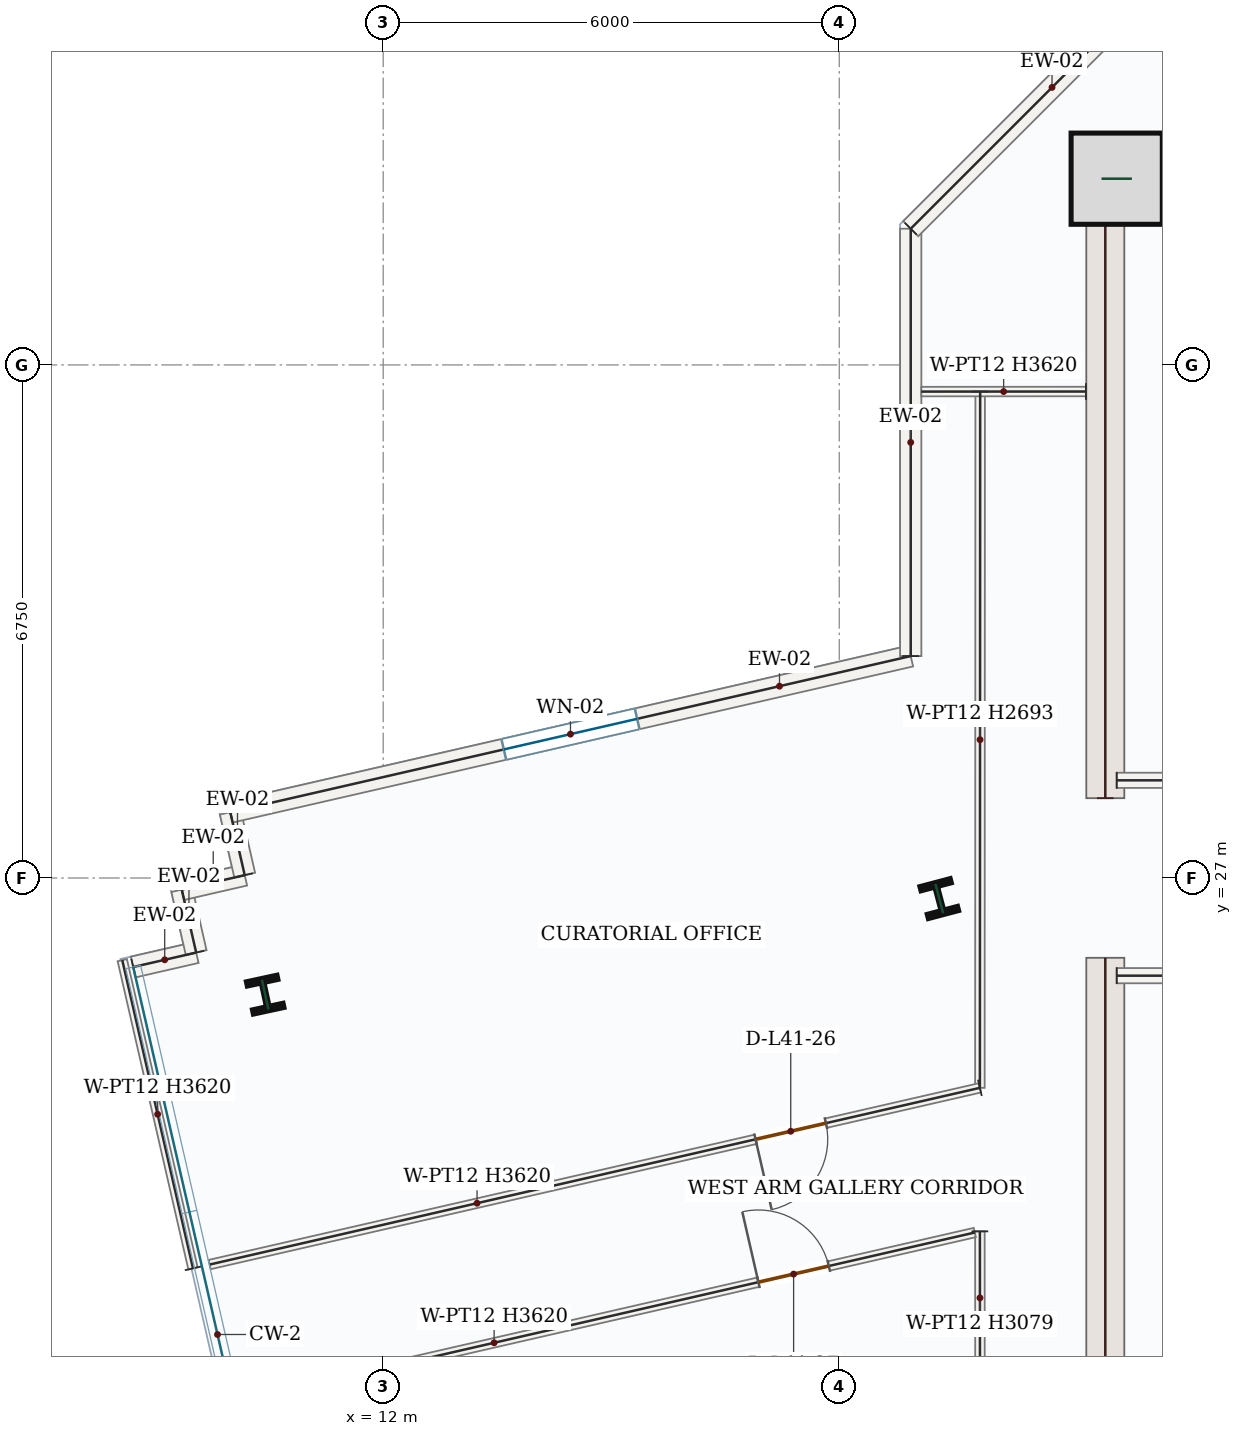
"""IFC4 building model, lengths in metres.
Left out: names, types, materials, properties, quantities, classifications, styles, units other than length and angle.
Written with IfcOpenShell. Run it as: python <this file> out.ifc"""

import sys

from ifc_helpers import new_model, si_unit, direction, frame, frame_2d, origin, origin_2d, place, context, subcontext, project, spatial, rectangle, i_section, extrude, source, transform, mapped, element, fill, save


model = new_model("IFC4")
c1 = context("Model", 3, precision=1e-05, world=origin(), true_north=direction((0.0, 1.0)))
c2 = subcontext(c1, "Body", "Model", "MODEL_VIEW")
j1 = project(units=[si_unit("LENGTHUNIT", "METRE"), si_unit("PLANEANGLEUNIT", "RADIAN")], contexts=[c1])
p1 = place(None, origin())
s1 = spatial("IfcSite", under=j1, at=p1, CompositionType="ELEMENT")
p2 = place(p1, origin())
s2 = spatial("IfcBuilding", under=s1, at=p2, CompositionType="ELEMENT")
p3 = place(p2, frame((0.0, 0.0, 178.5)))
s3 = spatial("IfcBuildingStorey", under=s2, at=p3, CompositionType="ELEMENT", Elevation=178.5)
m1 = source(origin(), c2, "Body", "SweptSolid", [
    extrude(rectangle(XDim=8.55, YDim=0.5, at=frame_2d((4.275, 0.0))), origin(), (0.0, 0.0, 1.0), 3.62),
])
for number, where, z_axis, x_axis in (
    (1, (21.5, 17.4, 0.0), (0.0, 0.0, 1.0), (0.0, 1.0, 0.0)),
    (2, (21.5, 28.05, 0.0), (0.0, 0.0, 1.0), (0.0, 1.0, 0.0)),
):
    element("IfcWall", number, at=place(p3, frame(where, z_axis=z_axis, x_axis=x_axis)), inside=s3, PredefinedType="SHEAR", context=c2, shape_type="MappedRepresentation", body=[
        mapped(m1, transform((0.0, 0.0, 0.0), x_axis=(1.0, 0.0, 0.0), y_axis=(0.0, 1.0, 0.0), z_axis=(0.0, 0.0, 1.0), scale=1.0)),
    ])
m2 = source(origin(), c2, "Body", "SweptSolid", [
    extrude(rectangle(XDim=7.0, YDim=0.5, at=frame_2d((3.5, 0.0))), origin(), (0.0, 0.0, 1.0), 3.62),
])
p4 = place(p3, frame((21.75, 36.35, 0.0), z_axis=(0.0, 0.0, 1.0), x_axis=(1.0, 0.0, 0.0)))
e3 = element("IfcWall", 3, at=p4, inside=s3, PredefinedType="SHEAR", context=c2, shape_type="MappedRepresentation", body=[
    mapped(m2, transform((0.0, 0.0, 0.0), x_axis=(1.0, 0.0, 0.0), y_axis=(0.0, 1.0, 0.0), z_axis=(0.0, 0.0, 1.0), scale=1.0)),
])
m3 = source(origin(), c2, "Body", "SweptSolid", [
    extrude(rectangle(XDim=1.2, YDim=1.2, at=origin_2d()), origin(), (0.0, 0.0, 1.0), 3.9),
])
p5 = place(p3, frame((21.65, 36.2, 0.0), z_axis=(0.0, 0.0, 1.0), x_axis=(1.0, 0.0, 0.0)))
e4 = element("IfcColumn", 4, at=p5, inside=s3, PredefinedType="COLUMN", context=c2, shape_type="MappedRepresentation", body=[
    mapped(m3, transform((0.0, 0.0, 0.0), x_axis=(1.0, 0.0, 0.0), y_axis=(0.0, 1.0, 0.0), z_axis=(0.0, 0.0, 1.0), scale=1.0)),
])
m4 = source(origin(), c2, "Body", "SweptSolid", [
    extrude(i_section(OverallWidth=0.412, OverallDepth=0.435, WebThickness=0.036, FlangeThickness=0.057, FilletRadius=0.018, at=origin_2d()), origin(), (0.0, 0.0, 1.0), 3.9),
])
for number, where, z_axis, x_axis in (
    (5, (19.316, 26.729, 0.0), (0.0, 0.0, 1.0), (0.967, 0.255, 0.0)),
    (6, (10.447, 25.465, 0.0), (0.0, 0.0, 1.0), (0.977, 0.211, 0.0)),
):
    element("IfcColumn", number, at=place(p3, frame(where, z_axis=z_axis, x_axis=x_axis)), inside=s3, PredefinedType="COLUMN", context=c2, shape_type="MappedRepresentation", body=[
        mapped(m4, transform((0.0, 0.0, 0.0), x_axis=(1.0, 0.0, 0.0), y_axis=(0.0, 1.0, 0.0), z_axis=(0.0, 0.0, 1.0), scale=1.0)),
    ])
m5 = source(origin(), c2, "Body", "SweptSolid", [
    extrude(rectangle(XDim=0.85, YDim=0.28, at=frame_2d((0.425, 0.0))), origin(), (0.0, 0.0, 1.0), 3.62),
])
p6 = place(p3, frame((8.711, 25.829, 0.0), z_axis=(0.0, 0.0, 1.0), x_axis=(0.974704946586, 0.223495563939, 0.0)))
e7 = element("IfcWall", 7, at=p6, inside=s3, PredefinedType="SOLIDWALL", context=c2, shape_type="MappedRepresentation", body=[
    mapped(m5, transform((0.0, 0.0, 0.0), x_axis=(1.0, 0.0, 0.0), y_axis=(0.0, 1.0, 0.0), z_axis=(0.0, 0.0, 1.0), scale=1.0)),
])
m6 = source(origin(), c2, "Body", "SweptSolid", [
    extrude(rectangle(XDim=0.85, YDim=0.28, at=frame_2d((0.425, 0.0))), origin(), (0.0, 0.0, 1.0), 3.62),
])
p7 = place(p3, frame((9.539, 26.019, 0.0), z_axis=(0.0, 0.0, 1.0), x_axis=(-0.22316012353, 0.974781800849, 0.0)))
e8 = element("IfcWall", 8, at=p7, inside=s3, PredefinedType="SOLIDWALL", context=c2, shape_type="MappedRepresentation", body=[
    mapped(m6, transform((0.0, 0.0, 0.0), x_axis=(1.0, 0.0, 0.0), y_axis=(0.0, 1.0, 0.0), z_axis=(0.0, 0.0, 1.0), scale=1.0)),
])
for number, where, z_axis, x_axis in (
    (9, (9.35, 26.847, 0.0), (0.0, 0.0, 1.0), (0.975, 0.223, 0.0)),
    (10, (10.178, 27.037, 0.0), (0.0, 0.0, 1.0), (-0.224, 0.975, 0.0)),
):
    element("IfcWall", number, at=place(p3, frame(where, z_axis=z_axis, x_axis=x_axis)), inside=s3, PredefinedType="SOLIDWALL", context=c2, shape_type="MappedRepresentation", body=[
        mapped(m5, transform((0.0, 0.0, 0.0), x_axis=(1.0, 0.0, 0.0), y_axis=(0.0, 1.0, 0.0), z_axis=(0.0, 0.0, 1.0), scale=1.0)),
    ])
p8 = place(p3, frame((9.988, 27.866, 0.0), z_axis=(0.0, 0.0, 1.0), x_axis=(0.974680686557, 0.223601340005, 0.0)))
e11 = element("IfcWall", 11, at=p8, inside=s3, PredefinedType="SOLIDWALL", context=c2, shape_type="SweptSolid", body=[
    extrude(rectangle(XDim=9.185, YDim=0.28, at=frame_2d((4.592, 0.0))), origin(), (0.0, 0.0, 1.0), 3.62),
])
p9 = place(p8, frame((3.692, 0.0, 0.85)))
e12 = element("IfcOpeningElement", 12, at=p9, cuts=e11, PredefinedType="OPENING", context=c2, shape_type="SweptSolid", body=[
    extrude(rectangle(XDim=1.8, YDim=1.75, at=frame_2d((0.9, 0.875))), frame((0.0, 0.15, 0.0), z_axis=(0.0, -1.0, 0.0), x_axis=(1.0, 0.0, 0.0)), (0.0, 0.0, 1.0), 0.3),
])
m7 = source(origin(), c2, "Body", "SweptSolid", [
    extrude(rectangle(XDim=5.623, YDim=0.28, at=frame_2d((2.811, 0.0))), origin(), (0.0, 0.0, 1.0), 3.62),
])
p10 = place(p3, frame((18.94, 29.919, 0.0), z_axis=(0.0, 0.0, 1.0), x_axis=(0.0, 1.0, 0.0)))
e13 = element("IfcWall", 13, at=p10, inside=s3, PredefinedType="SOLIDWALL", context=c2, shape_type="MappedRepresentation", body=[
    mapped(m7, transform((0.0, 0.0, 0.0), x_axis=(1.0, 0.0, 0.0), y_axis=(0.0, 1.0, 0.0), z_axis=(0.0, 0.0, 1.0), scale=1.0)),
])
m8 = source(origin(), c2, "Body", "SweptSolid", [
    extrude(rectangle(XDim=5.258, YDim=0.28, at=frame_2d((2.629, 0.0))), origin(), (0.0, 0.0, 1.0), 3.62),
])
p11 = place(p3, frame((18.94, 35.542, 0.0), z_axis=(0.0, 0.0, 1.0), x_axis=(0.707106781187, 0.707106781187, 0.0)))
e14 = element("IfcWall", 14, at=p11, inside=s3, PredefinedType="SOLIDWALL", context=c2, shape_type="MappedRepresentation", body=[
    mapped(m8, transform((0.0, 0.0, 0.0), x_axis=(1.0, 0.0, 0.0), y_axis=(0.0, 1.0, 0.0), z_axis=(0.0, 0.0, 1.0), scale=1.0)),
])
m9 = source(origin(), c2, "Body", "SweptSolid", [
    extrude(rectangle(XDim=4.25, YDim=0.2, at=frame_2d((2.125, 0.0))), origin(), (0.0, 0.0, 1.0), 3.62),
])
for number, where, z_axis, x_axis in (
    (15, (21.65, 25.715, 0.0), (0.0, 0.0, 1.0), (1.0, 0.0, 0.0)),
    (16, (21.65, 28.285, 0.0), (0.0, 0.0, 1.0), (1.0, 0.0, 0.0)),
):
    element("IfcWall", number, at=place(p3, frame(where, z_axis=z_axis, x_axis=x_axis)), inside=s3, PredefinedType="SOLIDWALL", context=c2, shape_type="MappedRepresentation", body=[
        mapped(m9, transform((0.0, 0.0, 0.0), x_axis=(1.0, 0.0, 0.0), y_axis=(0.0, 1.0, 0.0), z_axis=(0.0, 0.0, 1.0), scale=1.0)),
    ])
m10 = source(origin(), c2, "Body", "SweptSolid", [
    extrude(rectangle(XDim=9.16, YDim=0.125, at=frame_2d((4.58, 0.0))), origin(), (0.0, 0.0, 1.0), 2.693),
])
p12 = place(p3, frame((19.854, 33.399, 0.0), z_axis=(0.0, 0.0, 1.0), x_axis=(-0.000399776093, -0.99999992009, 0.0)))
e17 = element("IfcWall", 17, at=p12, inside=s3, PredefinedType="PARTITIONING", context=c2, shape_type="MappedRepresentation", body=[
    mapped(m10, transform((0.0, 0.0, 0.0), x_axis=(1.0, 0.0, 0.0), y_axis=(0.0, 1.0, 0.0), z_axis=(0.0, 0.0, 1.0), scale=1.0)),
])
p13 = place(p3, frame((19.85, 24.239, 0.0), z_axis=(0.0, 0.0, 1.0), x_axis=(-0.974685214681, -0.223581600949, 0.0)))
e18 = element("IfcWall", 18, at=p13, inside=s3, PredefinedType="PARTITIONING", context=c2, shape_type="SweptSolid", body=[
    extrude(rectangle(XDim=10.396, YDim=0.125, at=frame_2d((5.198, 0.0))), origin(), (0.0, 0.0, 1.0), 3.62),
])
p14 = place(p13, frame((2.078, 0.0, 0.0)))
e19 = element("IfcOpeningElement", 19, at=p14, cuts=e18, PredefinedType="OPENING", context=c2, shape_type="SweptSolid", body=[
    extrude(rectangle(XDim=0.95, YDim=2.15, at=frame_2d((0.475, 1.075))), frame((0.0, 0.073, 0.0), z_axis=(0.0, -1.0, 0.0), x_axis=(1.0, 0.0, 0.0)), (0.0, 0.0, 1.0), 0.145),
])
m11 = source(origin(), c2, "Body", "SweptSolid", [
    extrude(rectangle(XDim=4.16, YDim=0.125, at=frame_2d((2.08, 0.0))), origin(), (0.0, 0.0, 1.0), 3.62),
])
p15 = place(p3, frame((9.497, 21.864, 0.0), z_axis=(0.0, 0.0, 1.0), x_axis=(-0.223599186995, 0.974681180477, 0.0)))
e20 = element("IfcWall", 20, at=p15, inside=s3, PredefinedType="PARTITIONING", context=c2, shape_type="MappedRepresentation", body=[
    mapped(m11, transform((0.0, 0.0, 0.0), x_axis=(1.0, 0.0, 0.0), y_axis=(0.0, 1.0, 0.0), z_axis=(0.0, 0.0, 1.0), scale=1.0)),
])
m12 = source(origin(), c2, "Body", "SweptSolid", [
    extrude(rectangle(XDim=2.165, YDim=0.125, at=frame_2d((1.083, 0.0))), origin(), (0.0, 0.0, 1.0), 3.62),
])
p16 = place(p3, frame((21.245, 33.4, 0.0), z_axis=(0.0, 0.0, 1.0), x_axis=(-0.999999942778, -0.000338294974, 0.0)))
e21 = element("IfcWall", 21, at=p16, inside=s3, PredefinedType="PARTITIONING", context=c2, shape_type="MappedRepresentation", body=[
    mapped(m12, transform((0.0, 0.0, 0.0), x_axis=(1.0, 0.0, 0.0), y_axis=(0.0, 1.0, 0.0), z_axis=(0.0, 0.0, 1.0), scale=1.0)),
])
m13 = source(origin(), c2, "Body", "SweptSolid", [
    extrude(rectangle(XDim=1.75, YDim=0.125, at=frame_2d((0.875, 0.0))), origin(), (0.0, 0.0, 1.0), 3.079),
])
p17 = place(p3, frame((19.85, 22.351, 0.0), z_axis=(0.0, 0.0, 1.0), x_axis=(0.000557957787, -0.999999844342, 0.0)))
e22 = element("IfcWall", 22, at=p17, inside=s3, PredefinedType="PARTITIONING", context=c2, shape_type="MappedRepresentation", body=[
    mapped(m13, transform((0.0, 0.0, 0.0), x_axis=(1.0, 0.0, 0.0), y_axis=(0.0, 1.0, 0.0), z_axis=(0.0, 0.0, 1.0), scale=1.0)),
])
p18 = place(p3, frame((10.128, 20.121, 0.0), z_axis=(0.0, 0.0, 1.0), x_axis=(0.974684890892, 0.223583012474, 0.0)))
e23 = element("IfcWall", 23, at=p18, inside=s3, PredefinedType="PARTITIONING", context=c2, shape_type="SweptSolid", body=[
    extrude(rectangle(XDim=9.905, YDim=0.125, at=frame_2d((4.953, 0.0))), origin(), (0.0, 0.0, 1.0), 3.62),
])
p19 = place(p18, frame((6.985, 0.0, 0.0)))
e24 = element("IfcOpeningElement", 24, at=p19, cuts=e23, PredefinedType="OPENING", context=c2, shape_type="SweptSolid", body=[
    extrude(rectangle(XDim=0.95, YDim=2.15, at=frame_2d((0.475, 1.075))), frame((0.0, 0.073, 0.0), z_axis=(0.0, -1.0, 0.0), x_axis=(1.0, 0.0, 0.0)), (0.0, 0.0, 1.0), 0.145),
])
m14 = source(origin(), c2, "Body", "SweptSolid", [
    extrude(rectangle(XDim=1.8, YDim=1.75, at=frame_2d((0.9, 0.875))), frame((0.0, 0.03, 0.0), z_axis=(0.0, -1.0, 0.0), x_axis=(1.0, 0.0, 0.0)), (0.0, 0.0, 1.0), 0.06),
])
p20 = place(p9, origin())
e25 = element("IfcWindow", 25, at=p20, inside=s3, PartitioningType="DOUBLE_PANEL_VERTICAL", PredefinedType="WINDOW", context=c2, shape_type="MappedRepresentation", body=[
    mapped(m14, transform((0.0, 0.0, 0.0), x_axis=(1.0, 0.0, 0.0), y_axis=(0.0, 1.0, 0.0), z_axis=(0.0, 0.0, 1.0), scale=1.0)),
])
fill(e12, e25)
m15 = source(origin(), c2, "Body", "SweptSolid", [
    extrude(rectangle(XDim=0.95, YDim=2.15, at=frame_2d((0.475, 1.075))), frame((0.0, 0.025, 0.0), z_axis=(0.0, -1.0, 0.0), x_axis=(1.0, 0.0, 0.0)), (0.0, 0.0, 1.0), 0.05),
])
p21 = place(p14, origin())
e26 = element("IfcDoor", 26, at=p21, inside=s3, OperationType="SINGLE_SWING_RIGHT", PredefinedType="DOOR", context=c2, shape_type="MappedRepresentation", body=[
    mapped(m15, transform((0.0, 0.0, 0.0), x_axis=(1.0, 0.0, 0.0), y_axis=(0.0, 1.0, 0.0), z_axis=(0.0, 0.0, 1.0), scale=1.0)),
])
fill(e19, e26)
p22 = place(p19, origin())
e27 = element("IfcDoor", 27, at=p22, inside=s3, OperationType="SINGLE_SWING_LEFT", PredefinedType="DOOR", context=c2, shape_type="MappedRepresentation", body=[
    mapped(m15, transform((0.0, 0.0, 0.0), x_axis=(1.0, 0.0, 0.0), y_axis=(0.0, 1.0, 0.0), z_axis=(0.0, 0.0, 1.0), scale=1.0)),
])
fill(e24, e27)
save(model, sys.argv[1])
